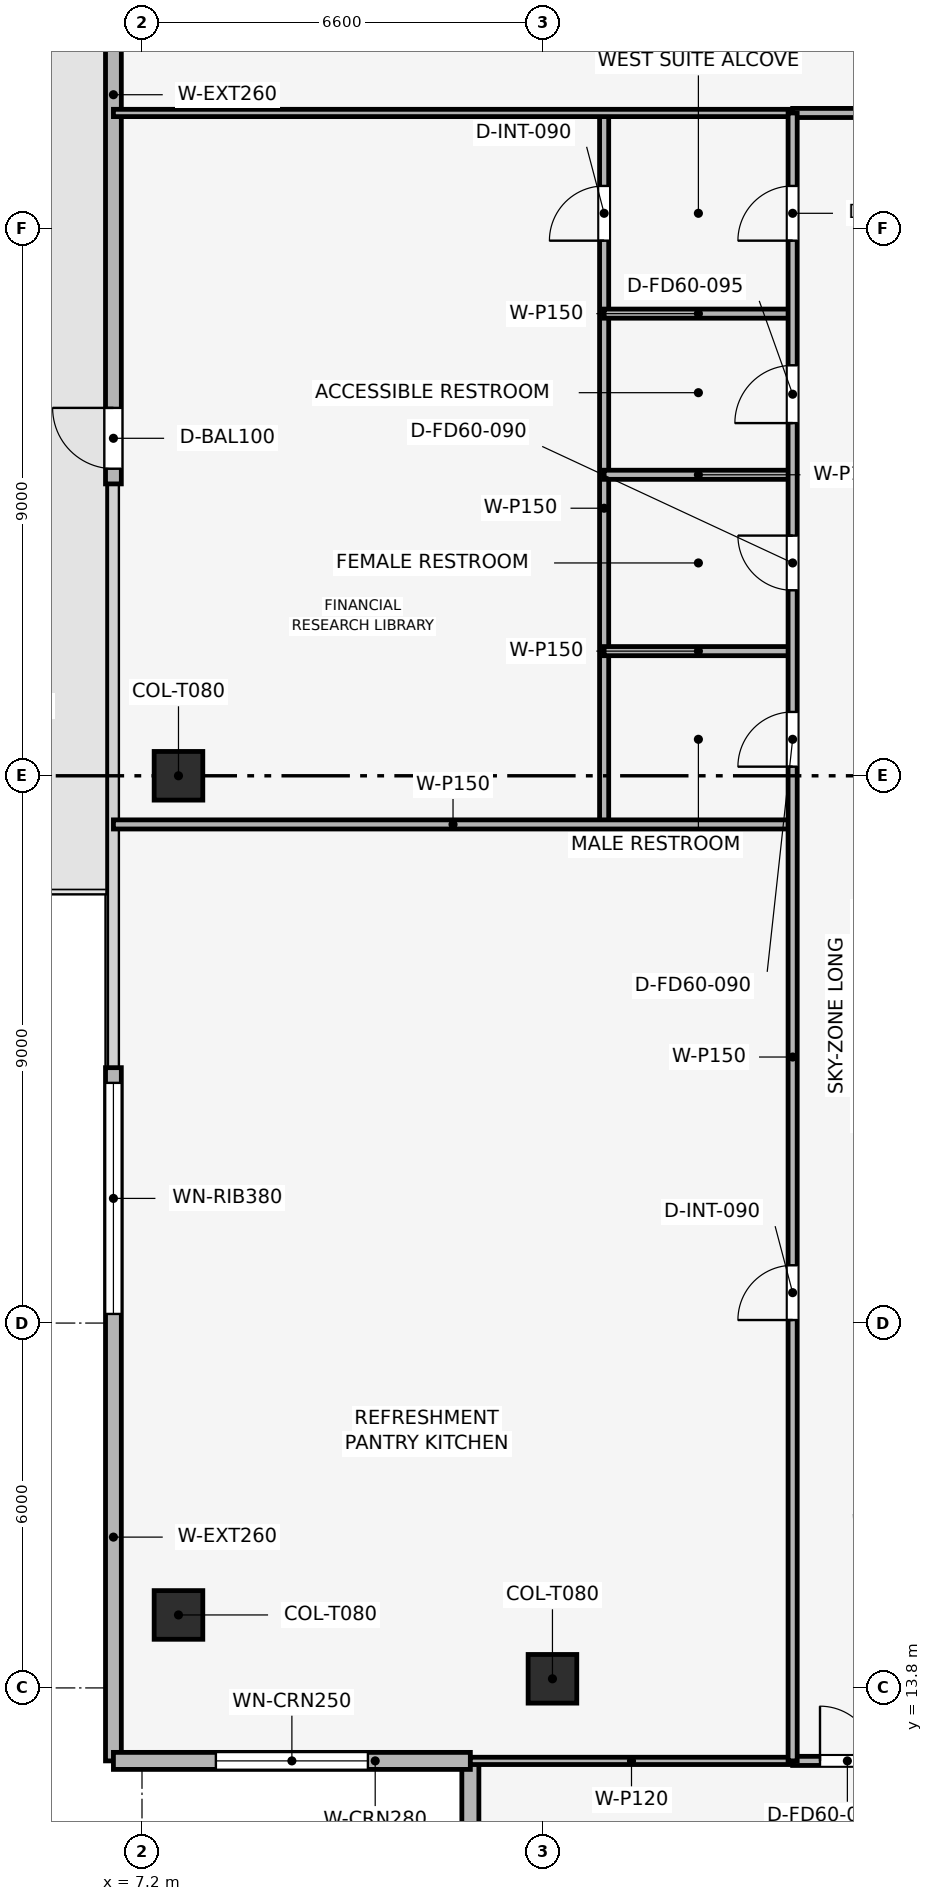
"""IFC4 building model, lengths in metres.
Left out: names, types, materials, properties, quantities, classifications, styles, units other than length and angle.
Written with IfcOpenShell. Run it as: python <this file> out.ifc"""

import sys

from ifc_helpers import new_model, si_unit, direction, frame, frame_2d, origin, origin_2d, place, context, subcontext, project, spatial, rectangle, extrude, element, fill, save


model = new_model("IFC4")
c1 = context("Model", 3, precision=1e-05, world=origin(), true_north=direction((0.0, 1.0)))
c2 = subcontext(c1, "Body", "Model", "MODEL_VIEW")
j1 = project(units=[si_unit("LENGTHUNIT", "METRE"), si_unit("PLANEANGLEUNIT", "RADIAN")], contexts=[c1])
p1 = place(None, origin())
s1 = spatial("IfcSite", under=j1, at=p1, CompositionType="ELEMENT")
p2 = place(p1, origin())
s2 = spatial("IfcBuilding", under=s1, at=p2, CompositionType="ELEMENT")
p3 = place(p2, frame((0.0, 0.0, 336.75)))
s3 = spatial("IfcBuildingStorey", under=s2, at=p3, CompositionType="ELEMENT", Elevation=336.75)
for number, where, z_axis, x_axis in (
    (1, (7.8, 28.8, 0.003), (0.0, 0.0, 1.0), (1.0, 0.0, 0.0)),
    (2, (7.8, 15.0, 0.003), (0.0, 0.0, 1.0), (1.0, 0.0, 0.0)),
    (3, (13.95, 13.95, 0.003), (0.0, 0.0, 1.0), (1.0, 0.0, 0.0)),
):
    element("IfcColumn", number, at=place(p3, frame(where, z_axis=z_axis, x_axis=x_axis)), inside=s3, PredefinedType="COLUMN", context=c2, shape_type="SweptSolid", body=[
        extrude(rectangle(XDim=0.8, YDim=0.8, at=origin_2d()), origin(), (0.0, 0.0, 1.0), 3.504),
    ])
p4 = place(p3, frame((6.73, 12.6, 0.0), z_axis=(0.0, 0.0, 1.0), x_axis=(0.0, 1.0, 0.0)))
e4 = element("IfcWall", 4, at=p4, inside=s3, PredefinedType="SOLIDWALL", context=c2, shape_type="SweptSolid", body=[
    extrude(rectangle(XDim=11.4, YDim=0.26, at=frame_2d((5.7, 0.0))), origin(), (0.0, 0.0, 1.0), 3.51),
])
p5 = place(p4, frame((7.35, 0.0, 0.9)))
e5 = element("IfcOpeningElement", 5, at=p5, cuts=e4, PredefinedType="OPENING", context=c2, shape_type="SweptSolid", body=[
    extrude(rectangle(XDim=3.8, YDim=1.9, at=frame_2d((1.9, 0.95))), frame((0.0, 0.14, 0.0), z_axis=(0.0, -1.0, 0.0), x_axis=(1.0, 0.0, 0.0)), (0.0, 0.0, 1.0), 0.28),
])
p6 = place(p3, frame((6.73, 33.6, 0.0), z_axis=(0.0, 0.0, 1.0), x_axis=(0.0, 1.0, 0.0)))
e6 = element("IfcWall", 6, at=p6, inside=s3, PredefinedType="SOLIDWALL", context=c2, shape_type="SweptSolid", body=[
    extrude(rectangle(XDim=11.4, YDim=0.26, at=frame_2d((5.7, 0.0))), origin(), (0.0, 0.0, 1.0), 3.51),
])
p7 = place(p6, frame((0.25, 0.0, 0.0)))
e7 = element("IfcOpeningElement", 7, at=p7, cuts=e6, PredefinedType="OPENING", context=c2, shape_type="SweptSolid", body=[
    extrude(rectangle(XDim=1.0, YDim=2.2, at=frame_2d((0.5, 1.1))), frame((0.0, 0.14, 0.0), z_axis=(0.0, -1.0, 0.0), x_axis=(1.0, 0.0, 0.0)), (0.0, 0.0, 1.0), 0.28),
])
p8 = place(p3, frame((12.6, 6.73, 0.0), z_axis=(0.0, 0.0, 1.0), x_axis=(0.0, 1.0, 0.0)))
e8 = element("IfcWall", 8, at=p8, inside=s3, PredefinedType="SOLIDWALL", context=c2, shape_type="SweptSolid", body=[
    extrude(rectangle(XDim=5.87, YDim=0.28, at=frame_2d((2.935, 0.0))), origin(), (0.0, 0.0, 1.0), 3.51),
])
p9 = place(p8, frame((1.685, 0.0, 0.9)))
e9 = element("IfcOpeningElement", 9, at=p9, cuts=e8, PredefinedType="OPENING", context=c2, shape_type="SweptSolid", body=[
    extrude(rectangle(XDim=2.5, YDim=1.9, at=frame_2d((1.25, 0.95))), frame((0.0, 0.15, 0.0), z_axis=(0.0, -1.0, 0.0), x_axis=(1.0, 0.0, 0.0)), (0.0, 0.0, 1.0), 0.3),
])
p10 = place(p3, frame((12.6, 12.6, 0.0), z_axis=(0.0, 0.0, 1.0), x_axis=(-1.0, 0.0, 0.0)))
e10 = element("IfcWall", 10, at=p10, inside=s3, PredefinedType="SOLIDWALL", context=c2, shape_type="SweptSolid", body=[
    extrude(rectangle(XDim=5.87, YDim=0.28, at=frame_2d((2.935, 0.0))), origin(), (0.0, 0.0, 1.0), 3.51),
])
p11 = place(p10, frame((1.685, 0.0, 0.9)))
e11 = element("IfcOpeningElement", 11, at=p11, cuts=e10, PredefinedType="OPENING", context=c2, shape_type="SweptSolid", body=[
    extrude(rectangle(XDim=2.5, YDim=1.9, at=frame_2d((1.25, 0.95))), frame((0.0, 0.15, 0.0), z_axis=(0.0, -1.0, 0.0), x_axis=(1.0, 0.0, 0.0)), (0.0, 0.0, 1.0), 0.3),
])
p12 = place(p3, frame((14.8, 28.0, 0.0), z_axis=(0.0, 0.0, 1.0), x_axis=(0.0, 1.0, 0.0)))
e12 = element("IfcWall", 12, at=p12, inside=s3, PredefinedType="PARTITIONING", context=c2, shape_type="SweptSolid", body=[
    extrude(rectangle(XDim=11.7, YDim=0.15, at=frame_2d((5.85, 0.0))), origin(), (0.0, 0.0, 1.0), 3.095),
])
p13 = place(p12, frame((9.6, 0.0, 0.0)))
e13 = element("IfcOpeningElement", 13, at=p13, cuts=e12, PredefinedType="OPENING", context=c2, shape_type="SweptSolid", body=[
    extrude(rectangle(XDim=0.9, YDim=2.1, at=frame_2d((0.45, 1.05))), frame((0.0, 0.085, 0.0), z_axis=(0.0, -1.0, 0.0), x_axis=(1.0, 0.0, 0.0)), (0.0, 0.0, 1.0), 0.17),
])
p14 = place(p3, frame((6.73, 28.0, 0.0), z_axis=(0.0, 0.0, 1.0), x_axis=(1.0, 0.0, 0.0)))
e14 = element("IfcWall", 14, at=p14, inside=s3, PredefinedType="PARTITIONING", context=c2, shape_type="SweptSolid", body=[
    extrude(rectangle(XDim=11.17, YDim=0.15, at=frame_2d((5.585, 0.0))), origin(), (0.0, 0.0, 1.0), 3.135),
])
for number, where, z_axis, x_axis in (
    (15, (14.8, 36.4, 0.0), (0.0, 0.0, 1.0), (1.0, 0.0, 0.0)),
    (16, (14.8, 30.85, 0.0), (0.0, 0.0, 1.0), (1.0, 0.0, 0.0)),
    (17, (14.8, 33.75, 0.0), (0.0, 0.0, 1.0), (1.0, 0.0, 0.0)),
):
    element("IfcWall", number, at=place(p3, frame(where, z_axis=z_axis, x_axis=x_axis)), inside=s3, PredefinedType="PARTITIONING", context=c2, shape_type="SweptSolid", body=[
        extrude(rectangle(XDim=3.1, YDim=0.15, at=frame_2d((1.55, 0.0))), origin(), (0.0, 0.0, 1.0), 3.135),
    ])
p15 = place(p3, frame((12.6, 12.6, 0.0), z_axis=(0.0, 0.0, 1.0), x_axis=(1.0, 0.0, 0.0)))
e18 = element("IfcWall", 18, at=p15, inside=s3, PredefinedType="PARTITIONING", context=c2, shape_type="SweptSolid", body=[
    extrude(rectangle(XDim=5.3, YDim=0.12, at=frame_2d((2.65, 0.0))), origin(), (0.0, 0.0, 1.0), 3.195),
])
p16 = place(p3, frame((17.9, 12.6, 0.0), z_axis=(0.0, 0.0, 1.0), x_axis=(1.0, 0.0, 0.0)))
e19 = element("IfcWall", 19, at=p16, inside=s3, PredefinedType="PARTITIONING", context=c2, shape_type="SweptSolid", body=[
    extrude(rectangle(XDim=1.9, YDim=0.15, at=frame_2d((0.95, 0.0))), origin(), (0.0, 0.0, 1.0), 3.51),
])
p17 = place(p16, frame((0.45, 0.0, 0.0)))
e20 = element("IfcOpeningElement", 20, at=p17, cuts=e19, PredefinedType="OPENING", context=c2, shape_type="SweptSolid", body=[
    extrude(rectangle(XDim=0.9, YDim=2.1, at=frame_2d((0.45, 1.05))), frame((0.0, 0.085, 0.0), z_axis=(0.0, -1.0, 0.0), x_axis=(1.0, 0.0, 0.0)), (0.0, 0.0, 1.0), 0.17),
])
p18 = place(p3, frame((6.73, 39.7, 0.0), z_axis=(0.0, 0.0, 1.0), x_axis=(1.0, 0.0, 0.0)))
e21 = element("IfcWall", 21, at=p18, inside=s3, PredefinedType="PARTITIONING", context=c2, shape_type="SweptSolid", body=[
    extrude(rectangle(XDim=11.17, YDim=0.12, at=frame_2d((5.585, 0.0))), origin(), (0.0, 0.0, 1.0), 3.095),
])
p19 = place(p3, frame((17.9, 39.7, 0.0), z_axis=(0.0, 0.0, 1.0), x_axis=(1.0, 0.0, 0.0)))
e22 = element("IfcWall", 22, at=p19, inside=s3, PredefinedType="PARTITIONING", context=c2, shape_type="SweptSolid", body=[
    extrude(rectangle(XDim=21.8, YDim=0.15, at=frame_2d((10.9, 0.0))), origin(), (0.0, 0.0, 1.0), 3.095),
])
p20 = place(p19, frame((5.516, 0.0, 0.0)))
e23 = element("IfcOpeningElement", 23, at=p20, cuts=e22, PredefinedType="OPENING", context=c2, shape_type="SweptSolid", body=[
    extrude(rectangle(XDim=0.9, YDim=2.1, at=frame_2d((0.45, 1.05))), frame((0.0, 0.085, 0.0), z_axis=(0.0, -1.0, 0.0), x_axis=(1.0, 0.0, 0.0)), (0.0, 0.0, 1.0), 0.17),
])
p21 = place(p19, frame((16.416, 0.0, 0.0)))
e24 = element("IfcOpeningElement", 24, at=p21, cuts=e22, PredefinedType="OPENING", context=c2, shape_type="SweptSolid", body=[
    extrude(rectangle(XDim=0.9, YDim=2.1, at=frame_2d((0.45, 1.05))), frame((0.0, 0.085, 0.0), z_axis=(0.0, -1.0, 0.0), x_axis=(1.0, 0.0, 0.0)), (0.0, 0.0, 1.0), 0.17),
])
p22 = place(p3, frame((17.9, 12.6, 0.0), z_axis=(0.0, 0.0, 1.0), x_axis=(0.0, 1.0, 0.0)))
e25 = element("IfcWall", 25, at=p22, inside=s3, PredefinedType="PARTITIONING", context=c2, shape_type="SweptSolid", body=[
    extrude(rectangle(XDim=27.1, YDim=0.15, at=frame_2d((13.55, 0.0))), origin(), (0.0, 0.0, 1.0), 3.095),
])
p23 = place(p22, frame((7.25, 0.0, 0.0)))
e26 = element("IfcOpeningElement", 26, at=p23, cuts=e25, PredefinedType="OPENING", context=c2, shape_type="SweptSolid", body=[
    extrude(rectangle(XDim=0.9, YDim=2.1, at=frame_2d((0.45, 1.05))), frame((0.0, 0.085, 0.0), z_axis=(0.0, -1.0, 0.0), x_axis=(1.0, 0.0, 0.0)), (0.0, 0.0, 1.0), 0.17),
])
p24 = place(p22, frame((16.35, 0.0, 0.0)))
e27 = element("IfcOpeningElement", 27, at=p24, cuts=e25, PredefinedType="OPENING", context=c2, shape_type="SweptSolid", body=[
    extrude(rectangle(XDim=0.9, YDim=2.1, at=frame_2d((0.45, 1.05))), frame((0.0, 0.085, 0.0), z_axis=(0.0, -1.0, 0.0), x_axis=(1.0, 0.0, 0.0)), (0.0, 0.0, 1.0), 0.17),
])
p25 = place(p22, frame((19.25, 0.0, 0.0)))
e28 = element("IfcOpeningElement", 28, at=p25, cuts=e25, PredefinedType="OPENING", context=c2, shape_type="SweptSolid", body=[
    extrude(rectangle(XDim=0.9, YDim=2.1, at=frame_2d((0.45, 1.05))), frame((0.0, 0.085, 0.0), z_axis=(0.0, -1.0, 0.0), x_axis=(1.0, 0.0, 0.0)), (0.0, 0.0, 1.0), 0.17),
])
p26 = place(p22, frame((22.0, 0.0, 0.0)))
e29 = element("IfcOpeningElement", 29, at=p26, cuts=e25, PredefinedType="OPENING", context=c2, shape_type="SweptSolid", body=[
    extrude(rectangle(XDim=0.95, YDim=2.1, at=frame_2d((0.475, 1.05))), frame((0.0, 0.085, 0.0), z_axis=(0.0, -1.0, 0.0), x_axis=(1.0, 0.0, 0.0)), (0.0, 0.0, 1.0), 0.17),
])
p27 = place(p22, frame((25.0, 0.0, 0.0)))
e30 = element("IfcOpeningElement", 30, at=p27, cuts=e25, PredefinedType="OPENING", context=c2, shape_type="SweptSolid", body=[
    extrude(rectangle(XDim=0.9, YDim=2.1, at=frame_2d((0.45, 1.05))), frame((0.0, 0.085, 0.0), z_axis=(0.0, -1.0, 0.0), x_axis=(1.0, 0.0, 0.0)), (0.0, 0.0, 1.0), 0.17),
])
p28 = place(p7, origin())
e31 = element("IfcDoor", 31, at=p28, inside=s3, OperationType="SINGLE_SWING_RIGHT", PredefinedType="DOOR", context=c2, shape_type="SweptSolid", body=[
    extrude(rectangle(XDim=1.0, YDim=2.2, at=frame_2d((0.5, 1.1))), frame((0.0, 0.025, 0.0), z_axis=(0.0, -1.0, 0.0), x_axis=(1.0, 0.0, 0.0)), (0.0, 0.0, 1.0), 0.05),
])
fill(e7, e31)
p29 = place(p5, origin())
e32 = element("IfcWindow", 32, at=p29, inside=s3, PartitioningType="SINGLE_PANEL", PredefinedType="WINDOW", context=c2, shape_type="SweptSolid", body=[
    extrude(rectangle(XDim=3.8, YDim=1.9, at=frame_2d((1.9, 0.95))), frame((0.0, 0.03, 0.0), z_axis=(0.0, -1.0, 0.0), x_axis=(1.0, 0.0, 0.0)), (0.0, 0.0, 1.0), 0.06),
])
fill(e5, e32)
p30 = place(p11, origin())
e33 = element("IfcWindow", 33, at=p30, inside=s3, PartitioningType="SINGLE_PANEL", PredefinedType="WINDOW", context=c2, shape_type="SweptSolid", body=[
    extrude(rectangle(XDim=2.5, YDim=1.9, at=frame_2d((1.25, 0.95))), frame((0.0, 0.03, 0.0), z_axis=(0.0, -1.0, 0.0), x_axis=(1.0, 0.0, 0.0)), (0.0, 0.0, 1.0), 0.06),
])
fill(e11, e33)
p31 = place(p13, origin())
e34 = element("IfcDoor", 34, at=p31, inside=s3, OperationType="SINGLE_SWING_LEFT", PredefinedType="DOOR", context=c2, shape_type="SweptSolid", body=[
    extrude(rectangle(XDim=0.9, YDim=2.1, at=frame_2d((0.45, 1.05))), frame((0.0, 0.025, 0.0), z_axis=(0.0, -1.0, 0.0), x_axis=(1.0, 0.0, 0.0)), (0.0, 0.0, 1.0), 0.05),
])
fill(e13, e34)
p32 = place(p17, origin())
e35 = element("IfcDoor", 35, at=p32, inside=s3, OperationType="SINGLE_SWING_LEFT", PredefinedType="DOOR", context=c2, shape_type="SweptSolid", body=[
    extrude(rectangle(XDim=0.9, YDim=2.1, at=frame_2d((0.45, 1.05))), frame((0.0, 0.025, 0.0), z_axis=(0.0, -1.0, 0.0), x_axis=(1.0, 0.0, 0.0)), (0.0, 0.0, 1.0), 0.05),
])
fill(e20, e35)
p33 = place(p23, origin())
e36 = element("IfcDoor", 36, at=p33, inside=s3, OperationType="SINGLE_SWING_LEFT", PredefinedType="DOOR", context=c2, shape_type="SweptSolid", body=[
    extrude(rectangle(XDim=0.9, YDim=2.1, at=frame_2d((0.45, 1.05))), frame((0.0, 0.025, 0.0), z_axis=(0.0, -1.0, 0.0), x_axis=(1.0, 0.0, 0.0)), (0.0, 0.0, 1.0), 0.05),
])
fill(e26, e36)
p34 = place(p24, origin())
e37 = element("IfcDoor", 37, at=p34, inside=s3, OperationType="SINGLE_SWING_LEFT", PredefinedType="DOOR", context=c2, shape_type="SweptSolid", body=[
    extrude(rectangle(XDim=0.9, YDim=2.1, at=frame_2d((0.45, 1.05))), frame((0.0, 0.025, 0.0), z_axis=(0.0, -1.0, 0.0), x_axis=(1.0, 0.0, 0.0)), (0.0, 0.0, 1.0), 0.05),
])
fill(e27, e37)
p35 = place(p25, origin())
e38 = element("IfcDoor", 38, at=p35, inside=s3, OperationType="SINGLE_SWING_RIGHT", PredefinedType="DOOR", context=c2, shape_type="SweptSolid", body=[
    extrude(rectangle(XDim=0.9, YDim=2.1, at=frame_2d((0.45, 1.05))), frame((0.0, 0.025, 0.0), z_axis=(0.0, -1.0, 0.0), x_axis=(1.0, 0.0, 0.0)), (0.0, 0.0, 1.0), 0.05),
])
fill(e28, e38)
p36 = place(p26, origin())
e39 = element("IfcDoor", 39, at=p36, inside=s3, OperationType="SINGLE_SWING_LEFT", PredefinedType="DOOR", context=c2, shape_type="SweptSolid", body=[
    extrude(rectangle(XDim=0.95, YDim=2.1, at=frame_2d((0.475, 1.05))), frame((0.0, 0.025, 0.0), z_axis=(0.0, -1.0, 0.0), x_axis=(1.0, 0.0, 0.0)), (0.0, 0.0, 1.0), 0.05),
])
fill(e29, e39)
p37 = place(p27, origin())
e40 = element("IfcDoor", 40, at=p37, inside=s3, OperationType="SINGLE_SWING_LEFT", PredefinedType="DOOR", context=c2, shape_type="SweptSolid", body=[
    extrude(rectangle(XDim=0.9, YDim=2.1, at=frame_2d((0.45, 1.05))), frame((0.0, 0.025, 0.0), z_axis=(0.0, -1.0, 0.0), x_axis=(1.0, 0.0, 0.0)), (0.0, 0.0, 1.0), 0.05),
])
fill(e30, e40)
save(model, sys.argv[1])
